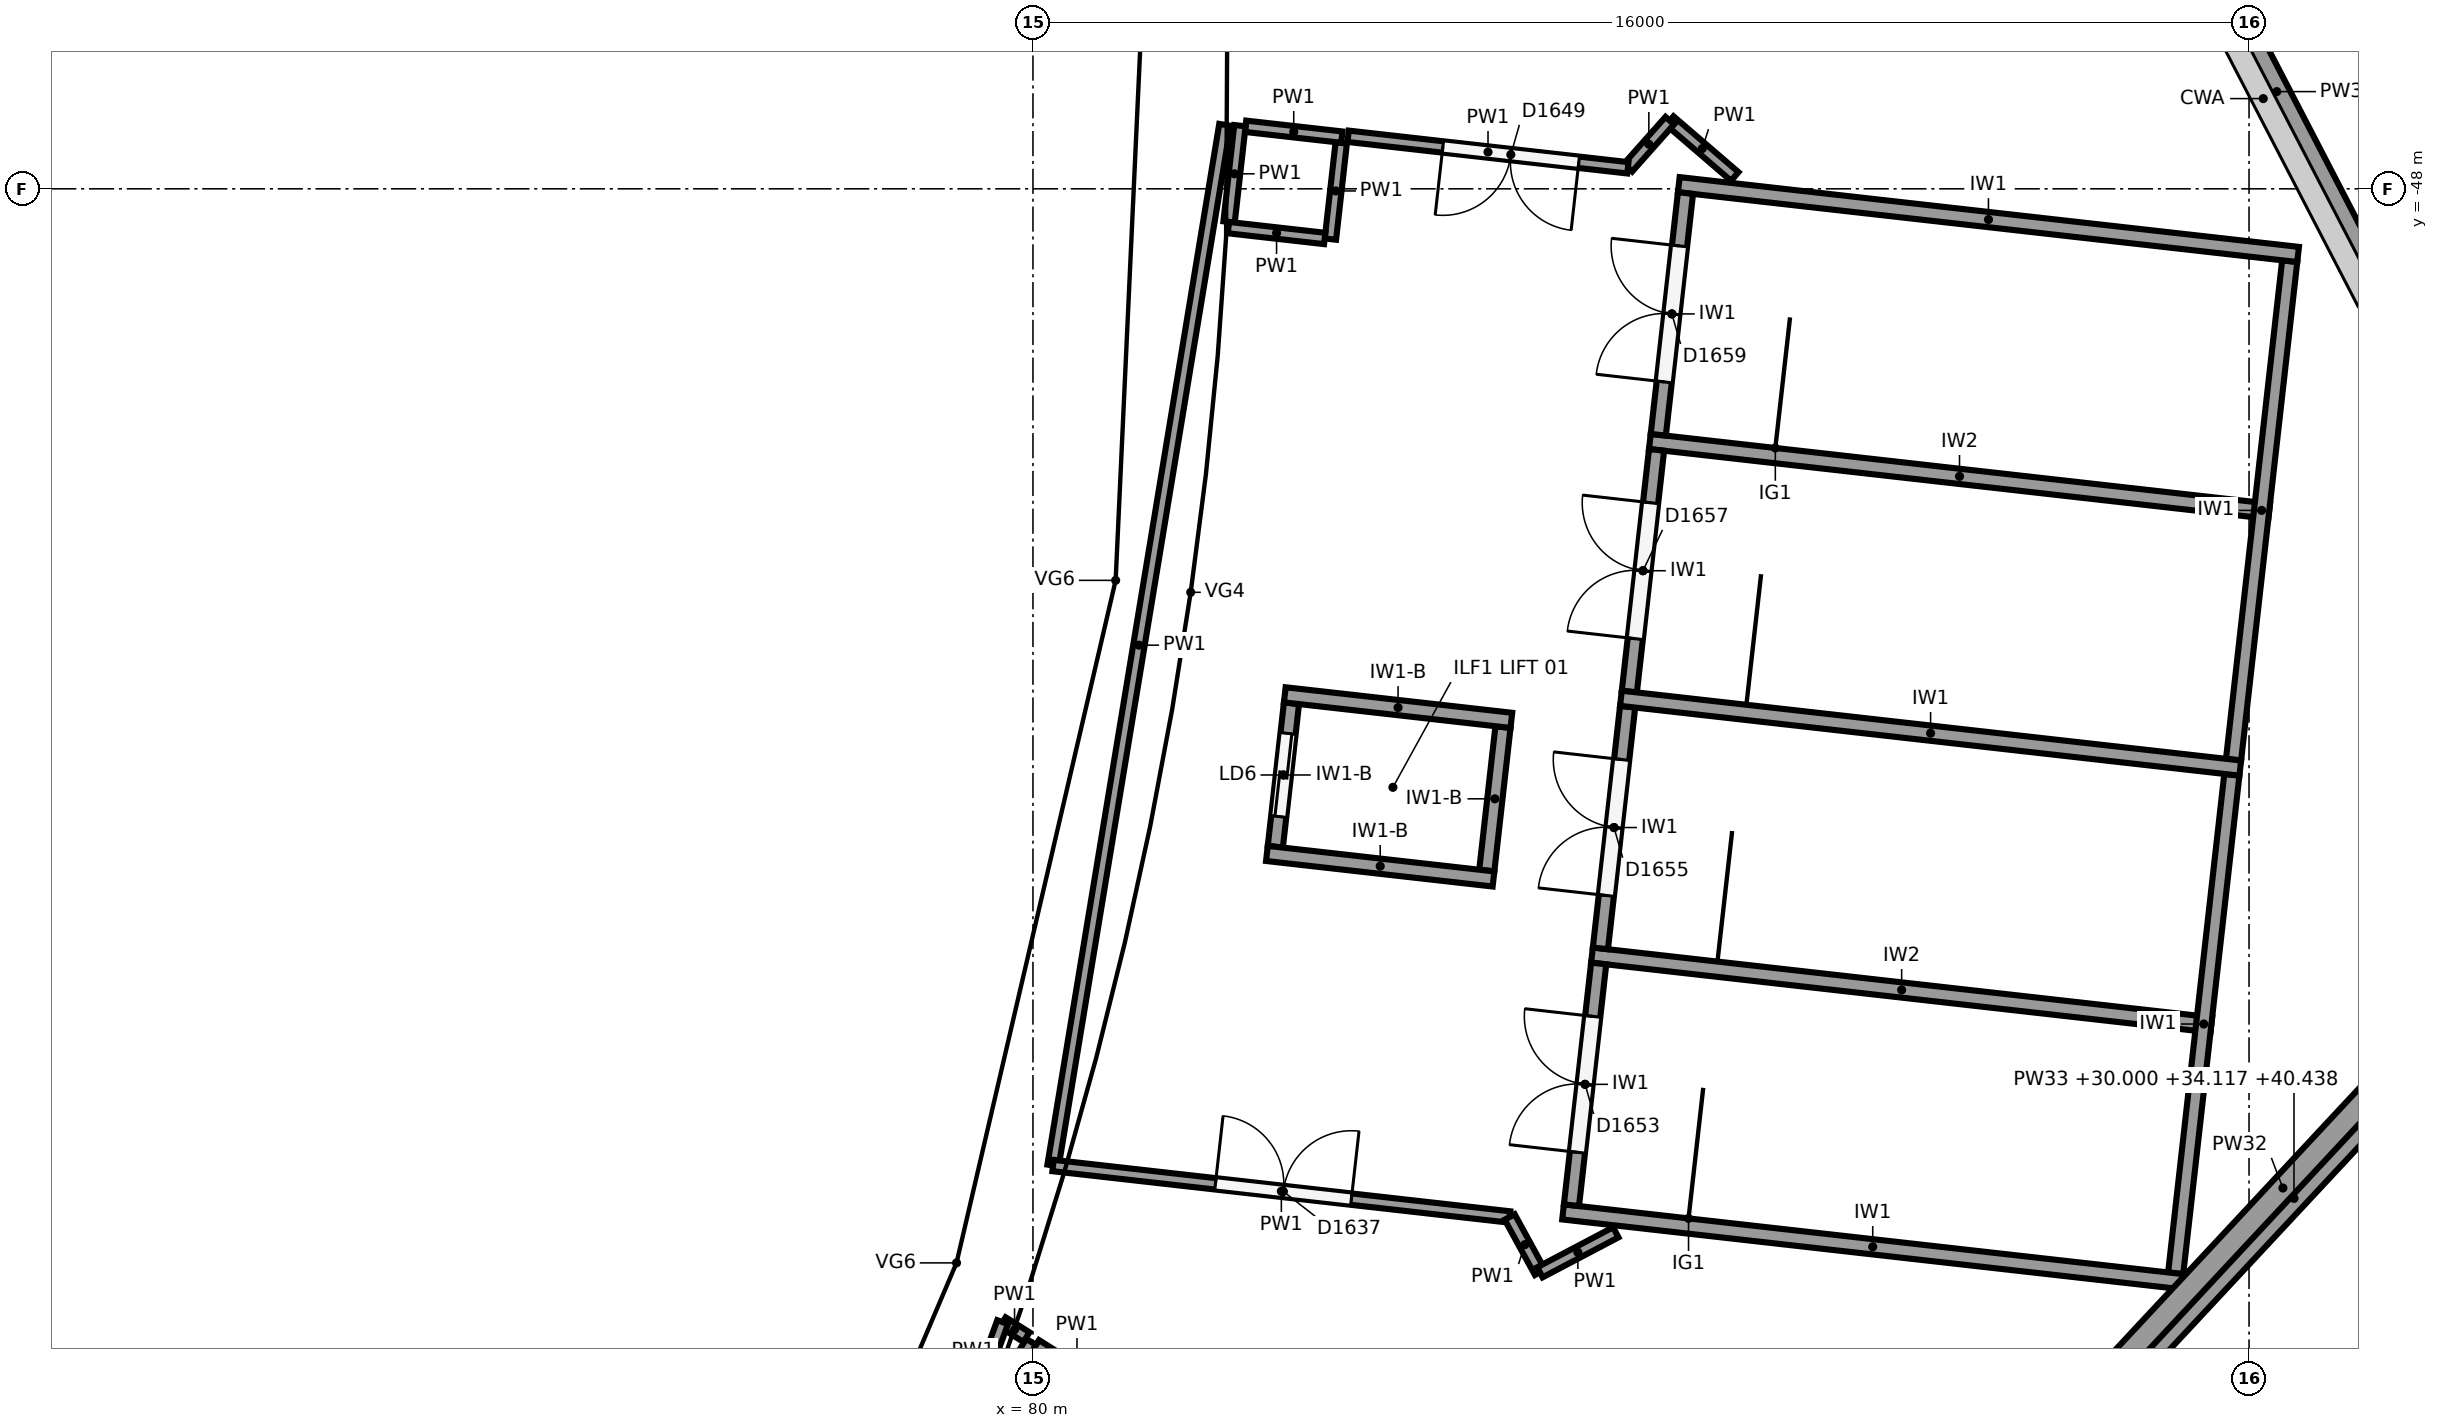
"""IFC4 building model, lengths in metres.
Left out: names, types, materials, properties, quantities, classifications, styles, units other than length and angle.
Written with IfcOpenShell. Run it as: python <this file> out.ifc"""

import sys

from ifc_helpers import new_model, si_unit, direction, frame, frame_2d, origin, origin_2d, place, context, subcontext, project, spatial, polyline, rectangle, circle, outline, extrude, element, fill, save


model = new_model("IFC4")
c1 = context("Model", 3, precision=1e-05, world=origin(), true_north=direction((0.0, 1.0)))
c2 = subcontext(c1, "Body", "Model", "MODEL_VIEW")
j1 = project(units=[si_unit("LENGTHUNIT", "METRE"), si_unit("PLANEANGLEUNIT", "RADIAN")], contexts=[c1])
p1 = place(None, origin())
s1 = spatial("IfcSite", under=j1, at=p1, CompositionType="ELEMENT")
p2 = place(p1, origin())
s2 = spatial("IfcBuilding", under=s1, at=p2, CompositionType="ELEMENT")
p3 = place(p2, frame((0.0, 0.0, 24.0)))
s3 = spatial("IfcBuildingStorey", under=s2, at=p3, CompositionType="ELEMENT", Elevation=24.0)
p4 = place(p3, frame((84.363, -53.565, 0.0), z_axis=(0.0, 0.0, 1.0), x_axis=(1.0, 0.0, 0.0)))
e1 = element("IfcColumn", 1, at=p4, inside=s3, PredefinedType="COLUMN", context=c2, shape_type="SweptSolid", body=[
    extrude(circle(Radius=0.6, at=origin_2d()), origin(), (0.0, 0.0, 1.0), 6.0),
])
p5 = place(p3, frame((82.169, -63.034, 0.0), z_axis=(0.0, 0.0, 1.0), x_axis=(1.0, 0.0, 0.0)))
e2 = element("IfcColumn", 2, at=p5, inside=s3, PredefinedType="COLUMN", context=c2, shape_type="SweptSolid", body=[
    extrude(circle(Radius=0.5, at=origin_2d()), origin(), (0.0, 0.0, 1.0), 6.0),
])
p6 = place(p3, frame((94.984, -44.057, 5.65), z_axis=(0.0, 0.0, 1.0), x_axis=(0.460041593728, -0.887897365713, 0.0)))
e3 = element("IfcWall", 3, at=p6, inside=s3, PredefinedType="SOLIDWALL", context=c2, shape_type="SweptSolid", body=[
    extrude(outline(polyline([(0.0, 0.0), (6.0, 0.0), (6.0, 7.367), (0.0, 4.458), (0.0, 0.0)])), frame((0.0, 0.16, 0.0), z_axis=(0.0, -1.0, 0.0), x_axis=(1.0, 0.0, 0.0)), (0.0, 0.0, 1.0), 0.32),
])
p7 = place(p3, frame((100.711, -56.568, 0.0), z_axis=(0.0, 0.0, 1.0), x_axis=(-0.681794658463, -0.731543603411, 0.0)))
e4 = element("IfcWall", 4, at=p7, inside=s3, PredefinedType="SOLIDWALL", context=c2, shape_type="SweptSolid", body=[
    extrude(rectangle(XDim=12.514, YDim=0.32, at=frame_2d((6.257, 0.0))), origin(), (0.0, 0.0, 1.0), 6.0),
])
p8 = place(p3, frame((100.857, -56.705, 6.0), z_axis=(0.0, 0.0, 1.0), x_axis=(-0.681794658463, -0.731543603411, 0.0)))
e5 = element("IfcWall", 5, at=p8, inside=s3, PredefinedType="SOLIDWALL", context=c2, shape_type="SweptSolid", body=[
    extrude(outline(polyline([(0.0, 0.0), (12.514, 0.0), (12.514, 4.117), (0.0, 10.438), (0.0, 0.0)])), frame((0.0, 0.16, 0.0), z_axis=(0.0, -1.0, 0.0), x_axis=(1.0, 0.0, 0.0)), (0.0, 0.0, 1.0), 0.32),
])
p9 = place(p3, frame((95.123, -62.378, 0.0), z_axis=(0.0, 0.0, 1.0), x_axis=(-0.993710792168, 0.111977058046, 0.0)))
e6 = element("IfcWall", 6, at=p9, inside=s3, PredefinedType="SHEAR", context=c2, shape_type="SweptSolid", body=[
    extrude(rectangle(XDim=8.2, YDim=0.2, at=frame_2d((4.1, 0.0))), origin(), (0.0, 0.0, 1.0), 5.75),
])
p10 = place(p3, frame((95.885, -55.621, 0.0), z_axis=(0.0, 0.0, 1.0), x_axis=(-0.993711165474, 0.111973745194, 0.0)))
e7 = element("IfcWall", 7, at=p10, inside=s3, PredefinedType="SHEAR", context=c2, shape_type="SweptSolid", body=[
    extrude(rectangle(XDim=8.2, YDim=0.2, at=frame_2d((4.1, 0.0))), origin(), (0.0, 0.0, 1.0), 5.75),
])
p11 = place(p3, frame((96.646, -48.863, 0.0), z_axis=(0.0, 0.0, 1.0), x_axis=(-0.993714104693, 0.111947658007, 0.0)))
e8 = element("IfcWall", 8, at=p11, inside=s3, PredefinedType="SHEAR", context=c2, shape_type="SweptSolid", body=[
    extrude(rectangle(XDim=8.2, YDim=0.2, at=frame_2d((4.1, 0.0))), origin(), (0.0, 0.0, 1.0), 5.75),
])
for number, where, z_axis, x_axis in (
    (9, (95.035, -62.267, 0.0), (0.0, 0.0, 1.0), (0.112, 0.994, 0.0)),
    (10, (95.796, -55.51, 0.0), (0.0, 0.0, 1.0), (0.112, 0.994, 0.0)),
):
    element("IfcWall", number, at=place(p3, frame(where, z_axis=z_axis, x_axis=x_axis)), inside=s3, PredefinedType="SHEAR", context=c2, shape_type="SweptSolid", body=[
        extrude(rectangle(XDim=6.6, YDim=0.2, at=frame_2d((3.3, 0.0))), origin(), (0.0, 0.0, 1.0), 5.75),
    ])
p12 = place(p3, frame((95.504, -58.999, 0.0), z_axis=(0.0, 0.0, 1.0), x_axis=(-0.993710792168, 0.111977058046, 0.0)))
e11 = element("IfcWall", 11, at=p12, inside=s3, PredefinedType="SHEAR", context=c2, shape_type="SweptSolid", body=[
    extrude(rectangle(XDim=8.2, YDim=0.2, at=frame_2d((4.1, 0.0))), origin(), (0.0, 0.0, 1.0), 5.75),
])
p13 = place(p3, frame((96.265, -52.242, 0.0), z_axis=(0.0, 0.0, 1.0), x_axis=(-0.993713731549, 0.111950970206, 0.0)))
e12 = element("IfcWall", 12, at=p13, inside=s3, PredefinedType="SHEAR", context=c2, shape_type="SweptSolid", body=[
    extrude(rectangle(XDim=8.2, YDim=0.2, at=frame_2d((4.1, 0.0))), origin(), (0.0, 0.0, 1.0), 5.75),
])
p14 = place(p3, frame((87.085, -61.372, 0.0), z_axis=(0.0, 0.0, 1.0), x_axis=(0.11192190762, 0.993717005286, 0.0)))
e13 = element("IfcWall", 13, at=p14, inside=s3, PredefinedType="SHEAR", context=c2, shape_type="SweptSolid", body=[
    extrude(rectangle(XDim=3.2, YDim=0.2, at=frame_2d((1.6, 0.0))), origin(), (0.0, 0.0, 1.0), 5.75),
])
p15 = place(p14, frame((0.7, 0.0, 0.0)))
e14 = element("IfcOpeningElement", 14, at=p15, cuts=e13, PredefinedType="OPENING", context=c2, shape_type="SweptSolid", body=[
    extrude(rectangle(XDim=1.8, YDim=2.1, at=frame_2d((0.9, 1.05))), frame((0.0, 0.11, 0.0), z_axis=(0.0, -1.0, 0.0), x_axis=(1.0, 0.0, 0.0)), (0.0, 0.0, 1.0), 0.22),
])
p16 = place(p3, frame((87.466, -57.993, 0.0), z_axis=(0.0, 0.0, 1.0), x_axis=(0.111997244021, 0.993708517288, 0.0)))
e15 = element("IfcWall", 15, at=p16, inside=s3, PredefinedType="SHEAR", context=c2, shape_type="SweptSolid", body=[
    extrude(rectangle(XDim=3.2, YDim=0.2, at=frame_2d((1.6, 0.0))), origin(), (0.0, 0.0, 1.0), 5.75),
])
p17 = place(p16, frame((0.7, 0.0, 0.0)))
e16 = element("IfcOpeningElement", 16, at=p17, cuts=e15, PredefinedType="OPENING", context=c2, shape_type="SweptSolid", body=[
    extrude(rectangle(XDim=1.8, YDim=2.1, at=frame_2d((0.9, 1.05))), frame((0.0, 0.11, 0.0), z_axis=(0.0, -1.0, 0.0), x_axis=(1.0, 0.0, 0.0)), (0.0, 0.0, 1.0), 0.22),
])
p18 = place(p3, frame((87.846, -54.614, 0.0), z_axis=(0.0, 0.0, 1.0), x_axis=(0.112005735442, 0.993707560215, 0.0)))
e17 = element("IfcWall", 17, at=p18, inside=s3, PredefinedType="SHEAR", context=c2, shape_type="SweptSolid", body=[
    extrude(rectangle(XDim=3.2, YDim=0.2, at=frame_2d((1.6, 0.0))), origin(), (0.0, 0.0, 1.0), 5.75),
])
p19 = place(p18, frame((0.7, 0.0, 0.0)))
e18 = element("IfcOpeningElement", 18, at=p19, cuts=e17, PredefinedType="OPENING", context=c2, shape_type="SweptSolid", body=[
    extrude(rectangle(XDim=1.8, YDim=2.1, at=frame_2d((0.9, 1.05))), frame((0.0, 0.11, 0.0), z_axis=(0.0, -1.0, 0.0), x_axis=(1.0, 0.0, 0.0)), (0.0, 0.0, 1.0), 0.22),
])
p20 = place(p3, frame((88.227, -51.236, 0.0), z_axis=(0.0, 0.0, 1.0), x_axis=(0.111930393474, 0.993716049491, 0.0)))
e19 = element("IfcWall", 19, at=p20, inside=s3, PredefinedType="SHEAR", context=c2, shape_type="SweptSolid", body=[
    extrude(rectangle(XDim=3.2, YDim=0.2, at=frame_2d((1.6, 0.0))), origin(), (0.0, 0.0, 1.0), 5.75),
])
p21 = place(p20, frame((0.7, 0.0, 0.0)))
e20 = element("IfcOpeningElement", 20, at=p21, cuts=e19, PredefinedType="OPENING", context=c2, shape_type="SweptSolid", body=[
    extrude(rectangle(XDim=1.8, YDim=2.1, at=frame_2d((0.9, 1.05))), frame((0.0, 0.11, 0.0), z_axis=(0.0, -1.0, 0.0), x_axis=(1.0, 0.0, 0.0)), (0.0, 0.0, 1.0), 0.22),
])
for number, where, z_axis, x_axis in (
    (21, (86.059, -57.08, 0.0), (0.0, 0.0, 1.0), (-0.994, 0.112, 0.0)),
    (22, (86.294, -54.993, 0.0), (0.0, 0.0, 1.0), (-0.994, 0.112, 0.0)),
):
    element("IfcWall", number, at=place(p3, frame(where, z_axis=z_axis, x_axis=x_axis)), inside=s3, PredefinedType="SHEAR", context=c2, shape_type="SweptSolid", body=[
        extrude(rectangle(XDim=3.0, YDim=0.2, at=frame_2d((1.5, 0.0))), origin(), (0.0, 0.0, 1.0), 4.6),
    ])
p22 = place(p3, frame((85.971, -56.969, 0.0), z_axis=(0.0, 0.0, 1.0), x_axis=(0.112039012324, 0.993703808847, 0.0)))
e23 = element("IfcWall", 23, at=p22, inside=s3, PredefinedType="SHEAR", context=c2, shape_type="SweptSolid", body=[
    extrude(rectangle(XDim=1.9, YDim=0.2, at=frame_2d((0.95, 0.0))), origin(), (0.0, 0.0, 1.0), 4.6),
])
p23 = place(p3, frame((83.189, -56.656, 0.0), z_axis=(0.0, 0.0, 1.0), x_axis=(0.11191213732, 0.993718105662, 0.0)))
e24 = element("IfcWall", 24, at=p23, inside=s3, PredefinedType="SHEAR", context=c2, shape_type="SweptSolid", body=[
    extrude(rectangle(XDim=1.9, YDim=0.2, at=frame_2d((0.95, 0.0))), origin(), (0.0, 0.0, 1.0), 4.6),
])
p24 = place(p23, frame((0.4, 0.0, 0.0)))
e25 = element("IfcOpeningElement", 25, at=p24, cuts=e24, PredefinedType="OPENING", context=c2, shape_type="SweptSolid", body=[
    extrude(rectangle(XDim=1.1, YDim=2.1, at=frame_2d((0.55, 1.05))), frame((0.0, 0.11, 0.0), z_axis=(0.0, -1.0, 0.0), x_axis=(1.0, 0.0, 0.0)), (0.0, 0.0, 1.0), 0.22),
])
for number, where, z_axis, x_axis in (
    (26, (83.913, -48.662, 0.0), (0.0, 0.0, 1.0), (0.112, 0.994, 0.0)),
    (27, (84.064, -47.32, 0.0), (0.0, 0.0, 1.0), (-0.994, 0.112, 0.0)),
):
    element("IfcWall", number, at=place(p3, frame(where, z_axis=z_axis, x_axis=x_axis)), inside=s3, PredefinedType="PARTITIONING", context=c2, shape_type="SweptSolid", body=[
        extrude(rectangle(XDim=1.275, YDim=0.15, at=frame_2d((0.638, 0.0))), origin(), (0.0, 0.0, 1.0), 5.4),
    ])
for number, where, z_axis, x_axis in (
    (28, (82.723, -47.169, 0.0), (0.0, 0.0, 1.0), (-0.112, -0.994, 0.0)),
    (29, (82.572, -48.51, 0.0), (0.0, 0.0, 1.0), (0.994, -0.112, 0.0)),
):
    element("IfcWall", number, at=place(p3, frame(where, z_axis=z_axis, x_axis=x_axis)), inside=s3, PredefinedType="PARTITIONING", context=c2, shape_type="SweptSolid", body=[
        extrude(rectangle(XDim=1.275, YDim=0.15, at=frame_2d((0.637, 0.0))), origin(), (0.0, 0.0, 1.0), 5.4),
    ])
p25 = place(p3, frame((89.234, -47.838, 0.0), z_axis=(0.0, 0.0, 1.0), x_axis=(-0.758277272593, 0.651932188091, 0.0)))
e30 = element("IfcWall", 30, at=p25, inside=s3, PredefinedType="PARTITIONING", context=c2, shape_type="SweptSolid", body=[
    extrude(rectangle(XDim=1.127, YDim=0.15, at=frame_2d((0.563, 0.0))), origin(), (0.0, 0.0, 1.0), 5.4),
])
p26 = place(p3, frame((88.379, -47.103, 0.0), z_axis=(0.0, 0.0, 1.0), x_axis=(-0.664272575109, -0.747490432018, 0.0)))
e31 = element("IfcWall", 31, at=p26, inside=s3, PredefinedType="PARTITIONING", context=c2, shape_type="SweptSolid", body=[
    extrude(rectangle(XDim=0.83, YDim=0.15, at=frame_2d((0.415, 0.0))), origin(), (0.0, 0.0, 1.0), 5.4),
])
p27 = place(p3, frame((87.827, -47.723, 0.0), z_axis=(0.0, 0.0, 1.0), x_axis=(-0.993709696009, 0.11198678519, 0.0)))
e32 = element("IfcWall", 32, at=p27, inside=s3, PredefinedType="PARTITIONING", context=c2, shape_type="SweptSolid", body=[
    extrude(rectangle(XDim=3.704, YDim=0.15, at=frame_2d((1.852, 0.0))), origin(), (0.0, 0.0, 1.0), 5.4),
])
p28 = place(p27, frame((0.65, 0.0, 0.0)))
e33 = element("IfcOpeningElement", 33, at=p28, cuts=e32, PredefinedType="OPENING", context=c2, shape_type="SweptSolid", body=[
    extrude(rectangle(XDim=1.8, YDim=2.1, at=frame_2d((0.9, 1.05))), frame((0.0, 0.085, 0.0), z_axis=(0.0, -1.0, 0.0), x_axis=(1.0, 0.0, 0.0)), (0.0, 0.0, 1.0), 0.17),
])
p29 = place(p3, frame((82.525, -47.158, 0.0), z_axis=(0.0, 0.0, 1.0), x_axis=(-0.162929544728, -0.986637706281, 0.0)))
e34 = element("IfcWall", 34, at=p29, inside=s3, PredefinedType="PARTITIONING", context=c2, shape_type="SweptSolid", body=[
    extrude(rectangle(XDim=13.877, YDim=0.15, at=frame_2d((6.938, 0.0))), origin(), (0.0, 0.0, 1.0), 5.4),
])
p30 = place(p3, frame((80.264, -60.85, 0.0), z_axis=(0.0, 0.0, 1.0), x_axis=(0.993711169243, -0.111973711744, 0.0)))
e35 = element("IfcWall", 35, at=p30, inside=s3, PredefinedType="PARTITIONING", context=c2, shape_type="SweptSolid", body=[
    extrude(rectangle(XDim=6.046, YDim=0.15, at=frame_2d((3.023, 0.0))), origin(), (0.0, 0.0, 1.0), 5.4),
])
p31 = place(p30, frame((2.15, 0.0, 0.0)))
e36 = element("IfcOpeningElement", 36, at=p31, cuts=e35, PredefinedType="OPENING", context=c2, shape_type="SweptSolid", body=[
    extrude(rectangle(XDim=1.8, YDim=2.1, at=frame_2d((0.9, 1.05))), frame((0.0, 0.085, 0.0), z_axis=(0.0, -1.0, 0.0), x_axis=(1.0, 0.0, 0.0)), (0.0, 0.0, 1.0), 0.17),
])
p32 = place(p3, frame((86.272, -61.527, 0.0), z_axis=(0.0, 0.0, 1.0), x_axis=(0.480336186773, -0.877084458691, 0.0)))
e37 = element("IfcWall", 37, at=p32, inside=s3, PredefinedType="PARTITIONING", context=c2, shape_type="SweptSolid", body=[
    extrude(rectangle(XDim=0.83, YDim=0.15, at=frame_2d((0.415, 0.0))), origin(), (0.0, 0.0, 1.0), 5.4),
])
p33 = place(p3, frame((86.67, -62.254, 0.0), z_axis=(0.0, 0.0, 1.0), x_axis=(0.884880656279, 0.465817801446, 0.0)))
e38 = element("IfcWall", 38, at=p33, inside=s3, PredefinedType="PARTITIONING", context=c2, shape_type="SweptSolid", body=[
    extrude(rectangle(XDim=1.128, YDim=0.15, at=frame_2d((0.564, 0.0))), origin(), (0.0, 0.0, 1.0), 5.4),
])
p34 = place(p3, frame((81.119, -63.888, 0.0), z_axis=(0.0, 0.0, 1.0), x_axis=(-0.846683377265, 0.532097038765, 0.0)))
e39 = element("IfcWall", 39, at=p34, inside=s3, PredefinedType="PARTITIONING", context=c2, shape_type="SweptSolid", body=[
    extrude(rectangle(XDim=1.275, YDim=0.15, at=frame_2d((0.638, 0.0))), origin(), (0.0, 0.0, 1.0), 5.4),
])
p35 = place(p3, frame((79.976, -63.17, 0.0), z_axis=(0.0, 0.0, 1.0), x_axis=(-0.531959757672, -0.846769635862, 0.0)))
e40 = element("IfcWall", 40, at=p35, inside=s3, PredefinedType="PARTITIONING", context=c2, shape_type="SweptSolid", body=[
    extrude(rectangle(XDim=1.275, YDim=0.15, at=frame_2d((0.637, 0.0))), origin(), (0.0, 0.0, 1.0), 5.4),
])
p36 = place(p3, frame((79.915, -63.107, 0.0), z_axis=(0.0, 0.0, 1.0), x_axis=(-0.846628080833, 0.5321850174, 0.0)))
e41 = element("IfcWall", 41, at=p36, inside=s3, PredefinedType="PARTITIONING", context=c2, shape_type="SweptSolid", body=[
    extrude(rectangle(XDim=0.371, YDim=0.15, at=frame_2d((0.186, 0.0))), origin(), (0.0, 0.0, 1.0), 5.4),
])
p37 = place(p3, frame((79.601, -62.91, 0.0), z_axis=(0.0, 0.0, 1.0), x_axis=(-0.341276475673, -0.939962960522, 0.0)))
e42 = element("IfcWall", 42, at=p37, inside=s3, PredefinedType="PARTITIONING", context=c2, shape_type="SweptSolid", body=[
    extrude(rectangle(XDim=1.26, YDim=0.15, at=frame_2d((0.63, 0.0))), origin(), (0.0, 0.0, 1.0), 5.4),
])
p38 = place(p15, origin())
e43 = element("IfcDoor", 43, at=p38, inside=s3, OperationType="DOUBLE_DOOR_SINGLE_SWING", PredefinedType="DOOR", context=c2, shape_type="SweptSolid", body=[
    extrude(rectangle(XDim=1.8, YDim=2.1, at=frame_2d((0.9, 1.05))), frame((0.0, 0.025, 0.0), z_axis=(0.0, -1.0, 0.0), x_axis=(1.0, 0.0, 0.0)), (0.0, 0.0, 1.0), 0.05),
])
fill(e14, e43)
p39 = place(p17, origin())
e44 = element("IfcDoor", 44, at=p39, inside=s3, OperationType="DOUBLE_DOOR_SINGLE_SWING", PredefinedType="DOOR", context=c2, shape_type="SweptSolid", body=[
    extrude(rectangle(XDim=1.8, YDim=2.1, at=frame_2d((0.9, 1.05))), frame((0.0, 0.025, 0.0), z_axis=(0.0, -1.0, 0.0), x_axis=(1.0, 0.0, 0.0)), (0.0, 0.0, 1.0), 0.05),
])
fill(e16, e44)
p40 = place(p19, origin())
e45 = element("IfcDoor", 45, at=p40, inside=s3, OperationType="DOUBLE_DOOR_SINGLE_SWING", PredefinedType="DOOR", context=c2, shape_type="SweptSolid", body=[
    extrude(rectangle(XDim=1.8, YDim=2.1, at=frame_2d((0.9, 1.05))), frame((0.0, 0.025, 0.0), z_axis=(0.0, -1.0, 0.0), x_axis=(1.0, 0.0, 0.0)), (0.0, 0.0, 1.0), 0.05),
])
fill(e18, e45)
p41 = place(p21, origin())
e46 = element("IfcDoor", 46, at=p41, inside=s3, OperationType="DOUBLE_DOOR_SINGLE_SWING", PredefinedType="DOOR", context=c2, shape_type="SweptSolid", body=[
    extrude(rectangle(XDim=1.8, YDim=2.1, at=frame_2d((0.9, 1.05))), frame((0.0, 0.025, 0.0), z_axis=(0.0, -1.0, 0.0), x_axis=(1.0, 0.0, 0.0)), (0.0, 0.0, 1.0), 0.05),
])
fill(e20, e46)
p42 = place(p24, origin())
e47 = element("IfcDoor", 47, at=p42, inside=s3, OperationType="SLIDING_TO_RIGHT", PredefinedType="DOOR", context=c2, shape_type="SweptSolid", body=[
    extrude(rectangle(XDim=1.1, YDim=2.1, at=frame_2d((0.55, 1.05))), frame((0.0, 0.025, 0.0), z_axis=(0.0, -1.0, 0.0), x_axis=(1.0, 0.0, 0.0)), (0.0, 0.0, 1.0), 0.05),
])
fill(e25, e47)
p43 = place(p31, origin())
e48 = element("IfcDoor", 48, at=p43, inside=s3, OperationType="DOUBLE_DOOR_SINGLE_SWING", PredefinedType="DOOR", context=c2, shape_type="SweptSolid", body=[
    extrude(rectangle(XDim=1.8, YDim=2.1, at=frame_2d((0.9, 1.05))), frame((0.0, 0.025, 0.0), z_axis=(0.0, -1.0, 0.0), x_axis=(1.0, 0.0, 0.0)), (0.0, 0.0, 1.0), 0.05),
])
fill(e36, e48)
p44 = place(p28, origin())
e49 = element("IfcDoor", 49, at=p44, inside=s3, OperationType="DOUBLE_DOOR_SINGLE_SWING", PredefinedType="DOOR", context=c2, shape_type="SweptSolid", body=[
    extrude(rectangle(XDim=1.8, YDim=2.1, at=frame_2d((0.9, 1.05))), frame((0.0, 0.025, 0.0), z_axis=(0.0, -1.0, 0.0), x_axis=(1.0, 0.0, 0.0)), (0.0, 0.0, 1.0), 0.05),
])
fill(e33, e49)
save(model, sys.argv[1])
